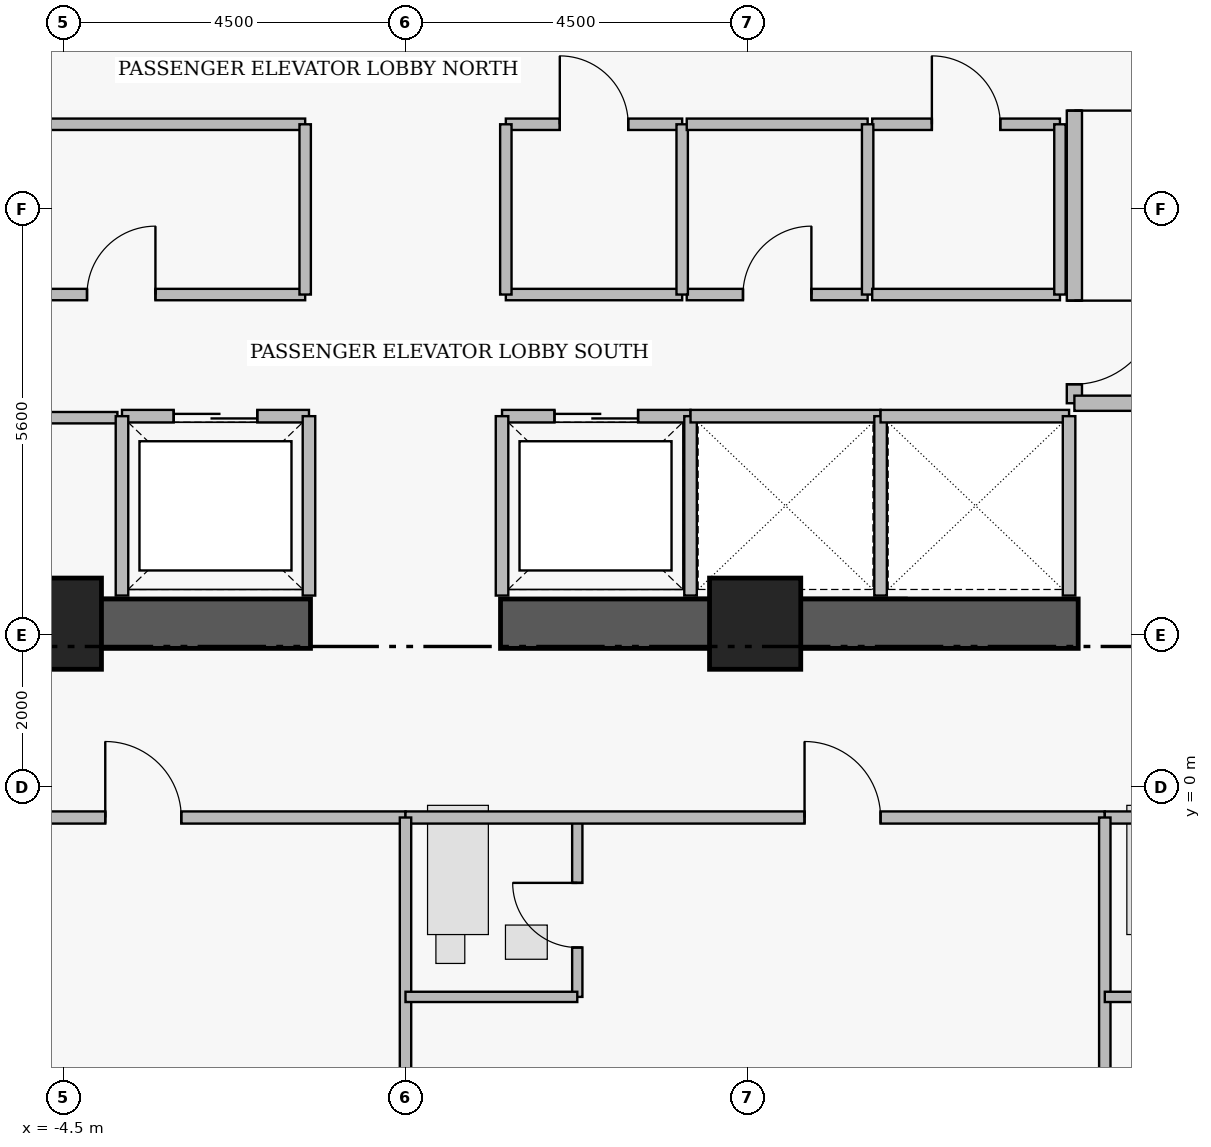
"""IFC4 building model, lengths in metres.
Left out: names, types, materials, properties, quantities, classifications, styles, units other than length and angle.
Written with IfcOpenShell. Run it as: python <this file> out.ifc"""

import sys

from ifc_helpers import new_model, si_unit, direction, frame, frame_2d, origin, origin_2d, place, context, subcontext, project, spatial, rectangle, extrude, element, fill, save


model = new_model("IFC4")
c1 = context("Model", 3, precision=1e-05, world=origin(), true_north=direction((0.0, 1.0)))
c2 = subcontext(c1, "Body", "Model", "MODEL_VIEW")
j1 = project(units=[si_unit("LENGTHUNIT", "METRE"), si_unit("PLANEANGLEUNIT", "RADIAN")], contexts=[c1])
p1 = place(None, origin())
s1 = spatial("IfcSite", under=j1, at=p1, CompositionType="ELEMENT")
p2 = place(p1, origin())
s2 = spatial("IfcBuilding", under=s1, at=p2, CompositionType="ELEMENT")
p3 = place(p2, frame((0.0, 0.0, 222.4)))
s3 = spatial("IfcBuildingStorey", under=s2, at=p3, CompositionType="ELEMENT", Elevation=222.4)
for number, where, z_axis, x_axis in (
    (1, (-8.85, 2.15, 0.0), (0.0, 0.0, 1.0), (1.0, 0.0, 0.0)),
    (2, (1.25, 2.15, 0.0), (0.0, 0.0, 1.0), (1.0, 0.0, 0.0)),
):
    element("IfcWall", number, at=place(p3, frame(where, z_axis=z_axis, x_axis=x_axis)), inside=s3, PredefinedType="SHEAR", context=c2, shape_type="SweptSolid", body=[
        extrude(rectangle(XDim=7.6, YDim=0.65, at=frame_2d((3.8, 0.0))), origin(), (0.0, 0.0, 1.0), 3.53),
    ])
for number, where, z_axis, x_axis in (
    (3, (-4.6, 2.15, 0.0), (0.0, 0.0, 1.0), (1.0, 0.0, 0.0)),
    (4, (4.6, 2.15, 0.0), (0.0, 0.0, 1.0), (1.0, 0.0, 0.0)),
):
    element("IfcColumn", number, at=place(p3, frame(where, z_axis=z_axis, x_axis=x_axis)), inside=s3, PredefinedType="COLUMN", context=c2, shape_type="SweptSolid", body=[
        extrude(rectangle(XDim=1.2, YDim=1.2, at=origin_2d()), origin(), (0.0, 0.0, 1.0), 3.75),
    ])
p4 = place(p3, frame((8.8, 11.15, 0.0), z_axis=(0.0, 0.0, 1.0), x_axis=(0.0, -1.0, 0.0)))
e5 = element("IfcWall", 5, at=p4, inside=s3, PredefinedType="PARTITIONING", context=c2, shape_type="SweptSolid", body=[
    extrude(rectangle(XDim=6.1, YDim=0.2, at=frame_2d((3.05, 0.0))), origin(), (0.0, 0.0, 1.0), 3.53),
])
p5 = place(p4, frame((1.15, 0.0, 0.0)))
e6 = element("IfcOpeningElement", 6, at=p5, cuts=e5, PredefinedType="OPENING", context=c2, shape_type="SweptSolid", body=[
    extrude(rectangle(XDim=1.1, YDim=2.2, at=frame_2d((0.55, 1.1))), frame((0.0, 0.11, 0.0), z_axis=(0.0, -1.0, 0.0), x_axis=(1.0, 0.0, 0.0)), (0.0, 0.0, 1.0), 0.22),
])
p6 = place(p4, frame((4.75, 0.0, 0.0)))
e7 = element("IfcOpeningElement", 7, at=p6, cuts=e5, PredefinedType="OPENING", context=c2, shape_type="SweptSolid", body=[
    extrude(rectangle(XDim=1.1, YDim=2.2, at=frame_2d((0.55, 1.1))), frame((0.0, 0.11, 0.0), z_axis=(0.0, -1.0, 0.0), x_axis=(1.0, 0.0, 0.0)), (0.0, 0.0, 1.0), 0.22),
])
p7 = place(p3, frame((-3.73, 4.88, 0.0), z_axis=(0.0, 0.0, 1.0), x_axis=(1.0, 0.0, 0.0)))
e8 = element("IfcWall", 8, at=p7, inside=s3, PredefinedType="PARTITIONING", context=c2, shape_type="SweptSolid", body=[
    extrude(rectangle(XDim=2.46, YDim=0.165, at=frame_2d((1.23, 0.0))), origin(), (0.0, 0.0, 1.0), 3.53),
])
p8 = place(p7, frame((0.68, 0.0, 0.0)))
e9 = element("IfcOpeningElement", 9, at=p8, cuts=e8, PredefinedType="OPENING", context=c2, shape_type="SweptSolid", body=[
    extrude(rectangle(XDim=1.1, YDim=2.25, at=frame_2d((0.55, 1.125))), frame((0.0, 0.093, 0.0), z_axis=(0.0, -1.0, 0.0), x_axis=(1.0, 0.0, 0.0)), (0.0, 0.0, 1.0), 0.185),
])
p9 = place(p3, frame((1.27, 4.88, 0.0), z_axis=(0.0, 0.0, 1.0), x_axis=(1.0, 0.0, 0.0)))
e10 = element("IfcWall", 10, at=p9, inside=s3, PredefinedType="PARTITIONING", context=c2, shape_type="SweptSolid", body=[
    extrude(rectangle(XDim=2.48, YDim=0.165, at=frame_2d((1.24, 0.0))), origin(), (0.0, 0.0, 1.0), 3.53),
])
p10 = place(p9, frame((0.69, 0.0, 0.0)))
e11 = element("IfcOpeningElement", 11, at=p10, cuts=e10, PredefinedType="OPENING", context=c2, shape_type="SweptSolid", body=[
    extrude(rectangle(XDim=1.1, YDim=2.25, at=frame_2d((0.55, 1.125))), frame((0.0, 0.093, 0.0), z_axis=(0.0, -1.0, 0.0), x_axis=(1.0, 0.0, 0.0)), (0.0, 0.0, 1.0), 0.185),
])
p11 = place(p3, frame((-8.31, 4.86, 0.0), z_axis=(0.0, 0.0, 1.0), x_axis=(1.0, 0.0, 0.0)))
e12 = element("IfcWall", 12, at=p11, inside=s3, PredefinedType="PARTITIONING", context=c2, shape_type="SweptSolid", body=[
    extrude(rectangle(XDim=4.52, YDim=0.15, at=frame_2d((2.26, 0.0))), origin(), (0.0, 0.0, 1.0), 3.53),
])
p12 = place(p11, frame((1.81, 0.0, 0.0)))
e13 = element("IfcOpeningElement", 13, at=p12, cuts=e12, PredefinedType="OPENING", context=c2, shape_type="SweptSolid", body=[
    extrude(rectangle(XDim=0.9, YDim=2.15, at=frame_2d((0.45, 1.075))), frame((0.0, 0.085, 0.0), z_axis=(0.0, -1.0, 0.0), x_axis=(1.0, 0.0, 0.0)), (0.0, 0.0, 1.0), 0.17),
])
p13 = place(p3, frame((-6.16, 6.48, 0.0), z_axis=(0.0, 0.0, 1.0), x_axis=(1.0, 0.0, 0.0)))
e14 = element("IfcWall", 14, at=p13, inside=s3, PredefinedType="PARTITIONING", context=c2, shape_type="SweptSolid", body=[
    extrude(rectangle(XDim=4.84, YDim=0.15, at=frame_2d((2.42, 0.0))), origin(), (0.0, 0.0, 1.0), 3.53),
])
p14 = place(p13, frame((1.97, 0.0, 0.0)))
e15 = element("IfcOpeningElement", 15, at=p14, cuts=e14, PredefinedType="OPENING", context=c2, shape_type="SweptSolid", body=[
    extrude(rectangle(XDim=0.9, YDim=2.15, at=frame_2d((0.45, 1.075))), frame((0.0, 0.085, 0.0), z_axis=(0.0, -1.0, 0.0), x_axis=(1.0, 0.0, 0.0)), (0.0, 0.0, 1.0), 0.17),
])
p15 = place(p3, frame((1.32, 8.72, 0.0), z_axis=(0.0, 0.0, 1.0), x_axis=(1.0, 0.0, 0.0)))
e16 = element("IfcWall", 16, at=p15, inside=s3, PredefinedType="PARTITIONING", context=c2, shape_type="SweptSolid", body=[
    extrude(rectangle(XDim=2.32, YDim=0.15, at=frame_2d((1.16, 0.0))), origin(), (0.0, 0.0, 1.0), 3.53),
])
p16 = place(p15, frame((0.71, 0.0, 0.0)))
e17 = element("IfcOpeningElement", 17, at=p16, cuts=e16, PredefinedType="OPENING", context=c2, shape_type="SweptSolid", body=[
    extrude(rectangle(XDim=0.9, YDim=2.15, at=frame_2d((0.45, 1.075))), frame((0.0, 0.085, 0.0), z_axis=(0.0, -1.0, 0.0), x_axis=(1.0, 0.0, 0.0)), (0.0, 0.0, 1.0), 0.17),
])
p17 = place(p3, frame((3.7, 6.48, 0.0), z_axis=(0.0, 0.0, 1.0), x_axis=(1.0, 0.0, 0.0)))
e18 = element("IfcWall", 18, at=p17, inside=s3, PredefinedType="PARTITIONING", context=c2, shape_type="SweptSolid", body=[
    extrude(rectangle(XDim=2.38, YDim=0.15, at=frame_2d((1.19, 0.0))), origin(), (0.0, 0.0, 1.0), 3.53),
])
p18 = place(p17, frame((0.74, 0.0, 0.0)))
e19 = element("IfcOpeningElement", 19, at=p18, cuts=e18, PredefinedType="OPENING", context=c2, shape_type="SweptSolid", body=[
    extrude(rectangle(XDim=0.9, YDim=2.15, at=frame_2d((0.45, 1.075))), frame((0.0, 0.085, 0.0), z_axis=(0.0, -1.0, 0.0), x_axis=(1.0, 0.0, 0.0)), (0.0, 0.0, 1.0), 0.17),
])
p19 = place(p3, frame((6.14, 8.72, 0.0), z_axis=(0.0, 0.0, 1.0), x_axis=(1.0, 0.0, 0.0)))
e20 = element("IfcWall", 20, at=p19, inside=s3, PredefinedType="PARTITIONING", context=c2, shape_type="SweptSolid", body=[
    extrude(rectangle(XDim=2.47, YDim=0.15, at=frame_2d((1.235, 0.0))), origin(), (0.0, 0.0, 1.0), 3.53),
])
p20 = place(p19, frame((0.785, 0.0, 0.0)))
e21 = element("IfcOpeningElement", 21, at=p20, cuts=e20, PredefinedType="OPENING", context=c2, shape_type="SweptSolid", body=[
    extrude(rectangle(XDim=0.9, YDim=2.15, at=frame_2d((0.45, 1.075))), frame((0.0, 0.085, 0.0), z_axis=(0.0, -1.0, 0.0), x_axis=(1.0, 0.0, 0.0)), (0.0, 0.0, 1.0), 0.17),
])
p21 = place(p3, frame((-9.2, -0.4, 0.0), z_axis=(0.0, 0.0, 1.0), x_axis=(1.0, 0.0, 0.0)))
e22 = element("IfcWall", 22, at=p21, inside=s3, PredefinedType="PARTITIONING", context=c2, shape_type="SweptSolid", body=[
    extrude(rectangle(XDim=9.2, YDim=0.16, at=frame_2d((4.6, 0.0))), origin(), (0.0, 0.0, 1.0), 3.53),
])
p22 = place(p21, frame((5.25, 0.0, 0.0)))
e23 = element("IfcOpeningElement", 23, at=p22, cuts=e22, PredefinedType="OPENING", context=c2, shape_type="SweptSolid", body=[
    extrude(rectangle(XDim=1.0, YDim=2.15, at=frame_2d((0.5, 1.075))), frame((0.0, 0.09, 0.0), z_axis=(0.0, -1.0, 0.0), x_axis=(1.0, 0.0, 0.0)), (0.0, 0.0, 1.0), 0.18),
])
p23 = place(p3, frame((2.26, -2.76, 0.0), z_axis=(0.0, 0.0, 1.0), x_axis=(0.0, 1.0, 0.0)))
e24 = element("IfcWall", 24, at=p23, inside=s3, PredefinedType="PLUMBINGWALL", context=c2, shape_type="SweptSolid", body=[
    extrude(rectangle(XDim=2.36, YDim=0.135, at=frame_2d((1.18, 0.0))), origin(), (0.0, 0.0, 1.0), 3.53),
])
p24 = place(p23, frame((0.65, 0.0, 0.0)))
e25 = element("IfcOpeningElement", 25, at=p24, cuts=e24, PredefinedType="OPENING", context=c2, shape_type="SweptSolid", body=[
    extrude(rectangle(XDim=0.85, YDim=2.1, at=frame_2d((0.425, 1.05))), frame((0.0, 0.077, 0.0), z_axis=(0.0, -1.0, 0.0), x_axis=(1.0, 0.0, 0.0)), (0.0, 0.0, 1.0), 0.155),
])
p25 = place(p3, frame((0.0, -0.4, 0.0), z_axis=(0.0, 0.0, 1.0), x_axis=(1.0, 0.0, 0.0)))
e26 = element("IfcWall", 26, at=p25, inside=s3, PredefinedType="PARTITIONING", context=c2, shape_type="SweptSolid", body=[
    extrude(rectangle(XDim=9.2, YDim=0.16, at=frame_2d((4.6, 0.0))), origin(), (0.0, 0.0, 1.0), 3.53),
])
p26 = place(p25, frame((5.25, 0.0, 0.0)))
e27 = element("IfcOpeningElement", 27, at=p26, cuts=e26, PredefinedType="OPENING", context=c2, shape_type="SweptSolid", body=[
    extrude(rectangle(XDim=1.0, YDim=2.15, at=frame_2d((0.5, 1.075))), frame((0.0, 0.09, 0.0), z_axis=(0.0, -1.0, 0.0), x_axis=(1.0, 0.0, 0.0)), (0.0, 0.0, 1.0), 0.18),
])
p27 = place(p3, frame((9.2, -0.4, 0.0), z_axis=(0.0, 0.0, 1.0), x_axis=(1.0, 0.0, 0.0)))
e28 = element("IfcWall", 28, at=p27, inside=s3, PredefinedType="PARTITIONING", context=c2, shape_type="SweptSolid", body=[
    extrude(rectangle(XDim=12.84, YDim=0.16, at=frame_2d((6.42, 0.0))), origin(), (0.0, 0.0, 1.0), 3.53),
])
p28 = place(p27, frame((7.07, 0.0, 0.0)))
e29 = element("IfcOpeningElement", 29, at=p28, cuts=e28, PredefinedType="OPENING", context=c2, shape_type="SweptSolid", body=[
    extrude(rectangle(XDim=1.0, YDim=2.15, at=frame_2d((0.5, 1.075))), frame((0.0, 0.09, 0.0), z_axis=(0.0, -1.0, 0.0), x_axis=(1.0, 0.0, 0.0)), (0.0, 0.0, 1.0), 0.18),
])
p29 = place(p3, frame((8.8, 5.05, 0.0), z_axis=(0.0, 0.0, 1.0), x_axis=(1.0, 0.0, 0.0)))
e30 = element("IfcWall", 30, at=p29, inside=s3, PredefinedType="PARTITIONING", context=c2, shape_type="SweptSolid", body=[
    extrude(rectangle(XDim=2.85, YDim=0.2, at=frame_2d((1.425, 0.0))), origin(), (0.0, 0.0, 1.0), 3.53),
])
for number, where, z_axis, x_axis in (
    (31, (-3.73, 2.52, 0.0), (0.0, 0.0, 1.0), (0.0, 1.0, 0.0)),
    (32, (-1.27, 2.52, 0.0), (0.0, 0.0, 1.0), (0.0, 1.0, 0.0)),
    (33, (1.27, 2.52, 0.0), (0.0, 0.0, 1.0), (0.0, 1.0, 0.0)),
    (34, (3.75, 2.52, 0.0), (0.0, 0.0, 1.0), (0.0, 1.0, 0.0)),
):
    element("IfcWall", number, at=place(p3, frame(where, z_axis=z_axis, x_axis=x_axis)), inside=s3, PredefinedType="PARTITIONING", context=c2, shape_type="SweptSolid", body=[
        extrude(rectangle(XDim=2.36, YDim=0.165, at=frame_2d((1.18, 0.0))), origin(), (0.0, 0.0, 1.0), 3.53),
    ])
p30 = place(p3, frame((3.75, 4.88, 0.0), z_axis=(0.0, 0.0, 1.0), x_axis=(1.0, 0.0, 0.0)))
e35 = element("IfcWall", 35, at=p30, inside=s3, PredefinedType="PARTITIONING", context=c2, shape_type="SweptSolid", body=[
    extrude(rectangle(XDim=2.5, YDim=0.165, at=frame_2d((1.25, 0.0))), origin(), (0.0, 0.0, 1.0), 3.53),
])
p31 = place(p3, frame((6.25, 2.52, 0.0), z_axis=(0.0, 0.0, 1.0), x_axis=(0.0, 1.0, 0.0)))
e36 = element("IfcWall", 36, at=p31, inside=s3, PredefinedType="PARTITIONING", context=c2, shape_type="SweptSolid", body=[
    extrude(rectangle(XDim=2.36, YDim=0.165, at=frame_2d((1.18, 0.0))), origin(), (0.0, 0.0, 1.0), 3.53),
])
p32 = place(p3, frame((6.25, 4.88, 0.0), z_axis=(0.0, 0.0, 1.0), x_axis=(1.0, 0.0, 0.0)))
e37 = element("IfcWall", 37, at=p32, inside=s3, PredefinedType="PARTITIONING", context=c2, shape_type="SweptSolid", body=[
    extrude(rectangle(XDim=2.48, YDim=0.165, at=frame_2d((1.24, 0.0))), origin(), (0.0, 0.0, 1.0), 3.53),
])
p33 = place(p3, frame((8.73, 2.52, 0.0), z_axis=(0.0, 0.0, 1.0), x_axis=(0.0, 1.0, 0.0)))
e38 = element("IfcWall", 38, at=p33, inside=s3, PredefinedType="PARTITIONING", context=c2, shape_type="SweptSolid", body=[
    extrude(rectangle(XDim=2.36, YDim=0.165, at=frame_2d((1.18, 0.0))), origin(), (0.0, 0.0, 1.0), 3.53),
])
p34 = place(p3, frame((-6.16, 8.72, 0.0), z_axis=(0.0, 0.0, 1.0), x_axis=(1.0, 0.0, 0.0)))
e39 = element("IfcWall", 39, at=p34, inside=s3, PredefinedType="PARTITIONING", context=c2, shape_type="SweptSolid", body=[
    extrude(rectangle(XDim=4.84, YDim=0.15, at=frame_2d((2.42, 0.0))), origin(), (0.0, 0.0, 1.0), 3.53),
])
p35 = place(p3, frame((-1.32, 6.48, 0.0), z_axis=(0.0, 0.0, 1.0), x_axis=(0.0, 1.0, 0.0)))
e40 = element("IfcWall", 40, at=p35, inside=s3, PredefinedType="PARTITIONING", context=c2, shape_type="SweptSolid", body=[
    extrude(rectangle(XDim=2.24, YDim=0.15, at=frame_2d((1.12, 0.0))), origin(), (0.0, 0.0, 1.0), 3.53),
])
p36 = place(p3, frame((1.32, 6.48, 0.0), z_axis=(0.0, 0.0, 1.0), x_axis=(1.0, 0.0, 0.0)))
e41 = element("IfcWall", 41, at=p36, inside=s3, PredefinedType="PARTITIONING", context=c2, shape_type="SweptSolid", body=[
    extrude(rectangle(XDim=2.32, YDim=0.15, at=frame_2d((1.16, 0.0))), origin(), (0.0, 0.0, 1.0), 3.53),
])
for number, where, z_axis, x_axis in (
    (42, (1.32, 6.48, 0.0), (0.0, 0.0, 1.0), (0.0, 1.0, 0.0)),
    (43, (3.64, 6.48, 0.0), (0.0, 0.0, 1.0), (0.0, 1.0, 0.0)),
):
    element("IfcWall", number, at=place(p3, frame(where, z_axis=z_axis, x_axis=x_axis)), inside=s3, PredefinedType="PARTITIONING", context=c2, shape_type="SweptSolid", body=[
        extrude(rectangle(XDim=2.24, YDim=0.15, at=frame_2d((1.12, 0.0))), origin(), (0.0, 0.0, 1.0), 3.53),
    ])
p37 = place(p3, frame((3.7, 8.72, 0.0), z_axis=(0.0, 0.0, 1.0), x_axis=(1.0, 0.0, 0.0)))
e44 = element("IfcWall", 44, at=p37, inside=s3, PredefinedType="PARTITIONING", context=c2, shape_type="SweptSolid", body=[
    extrude(rectangle(XDim=2.38, YDim=0.15, at=frame_2d((1.19, 0.0))), origin(), (0.0, 0.0, 1.0), 3.53),
])
p38 = place(p3, frame((6.08, 6.48, 0.0), z_axis=(0.0, 0.0, 1.0), x_axis=(0.0, 1.0, 0.0)))
e45 = element("IfcWall", 45, at=p38, inside=s3, PredefinedType="PARTITIONING", context=c2, shape_type="SweptSolid", body=[
    extrude(rectangle(XDim=2.24, YDim=0.15, at=frame_2d((1.12, 0.0))), origin(), (0.0, 0.0, 1.0), 3.53),
])
p39 = place(p3, frame((6.14, 6.48, 0.0), z_axis=(0.0, 0.0, 1.0), x_axis=(1.0, 0.0, 0.0)))
e46 = element("IfcWall", 46, at=p39, inside=s3, PredefinedType="PARTITIONING", context=c2, shape_type="SweptSolid", body=[
    extrude(rectangle(XDim=2.47, YDim=0.15, at=frame_2d((1.235, 0.0))), origin(), (0.0, 0.0, 1.0), 3.53),
])
p40 = place(p3, frame((8.61, 6.48, 0.0), z_axis=(0.0, 0.0, 1.0), x_axis=(0.0, 1.0, 0.0)))
e47 = element("IfcWall", 47, at=p40, inside=s3, PredefinedType="PARTITIONING", context=c2, shape_type="SweptSolid", body=[
    extrude(rectangle(XDim=2.24, YDim=0.15, at=frame_2d((1.12, 0.0))), origin(), (0.0, 0.0, 1.0), 3.53),
])
p41 = place(p3, frame((0.0, -7.52, 0.0), z_axis=(0.0, 0.0, 1.0), x_axis=(0.0, 1.0, 0.0)))
e48 = element("IfcWall", 48, at=p41, inside=s3, PredefinedType="PARTITIONING", context=c2, shape_type="SweptSolid", body=[
    extrude(rectangle(XDim=7.12, YDim=0.15, at=frame_2d((3.56, 0.0))), origin(), (0.0, 0.0, 1.0), 3.53),
])
p42 = place(p3, frame((0.0, -2.76, 0.0), z_axis=(0.0, 0.0, 1.0), x_axis=(1.0, 0.0, 0.0)))
e49 = element("IfcWall", 49, at=p42, inside=s3, PredefinedType="PLUMBINGWALL", context=c2, shape_type="SweptSolid", body=[
    extrude(rectangle(XDim=2.26, YDim=0.135, at=frame_2d((1.13, 0.0))), origin(), (0.0, 0.0, 1.0), 3.124),
])
p43 = place(p3, frame((9.2, -7.52, 0.0), z_axis=(0.0, 0.0, 1.0), x_axis=(0.0, 1.0, 0.0)))
e50 = element("IfcWall", 50, at=p43, inside=s3, PredefinedType="PARTITIONING", context=c2, shape_type="SweptSolid", body=[
    extrude(rectangle(XDim=7.12, YDim=0.15, at=frame_2d((3.56, 0.0))), origin(), (0.0, 0.0, 1.0), 3.53),
])
p44 = place(p3, frame((9.2, -2.76, 0.0), z_axis=(0.0, 0.0, 1.0), x_axis=(1.0, 0.0, 0.0)))
e51 = element("IfcWall", 51, at=p44, inside=s3, PredefinedType="PLUMBINGWALL", context=c2, shape_type="SweptSolid", body=[
    extrude(rectangle(XDim=2.26, YDim=0.135, at=frame_2d((1.13, 0.0))), origin(), (0.0, 0.0, 1.0), 3.124),
])
p45 = place(p5, origin())
e52 = element("IfcDoor", 52, at=p45, inside=s3, OperationType="SINGLE_SWING_RIGHT", PredefinedType="DOOR", context=c2, shape_type="SweptSolid", body=[
    extrude(rectangle(XDim=1.1, YDim=2.2, at=frame_2d((0.55, 1.1))), frame((0.0, 0.025, 0.0), z_axis=(0.0, -1.0, 0.0), x_axis=(1.0, 0.0, 0.0)), (0.0, 0.0, 1.0), 0.05),
])
fill(e6, e52)
p46 = place(p6, origin())
e53 = element("IfcDoor", 53, at=p46, inside=s3, OperationType="SINGLE_SWING_LEFT", PredefinedType="DOOR", context=c2, shape_type="SweptSolid", body=[
    extrude(rectangle(XDim=1.1, YDim=2.2, at=frame_2d((0.55, 1.1))), frame((0.0, 0.025, 0.0), z_axis=(0.0, -1.0, 0.0), x_axis=(1.0, 0.0, 0.0)), (0.0, 0.0, 1.0), 0.05),
])
fill(e7, e53)
p47 = place(p8, origin())
e54 = element("IfcDoor", 54, at=p47, inside=s3, OperationType="SLIDING_TO_LEFT", PredefinedType="DOOR", context=c2, shape_type="SweptSolid", body=[
    extrude(rectangle(XDim=1.1, YDim=2.25, at=frame_2d((0.55, 1.125))), frame((0.0, 0.025, 0.0), z_axis=(0.0, -1.0, 0.0), x_axis=(1.0, 0.0, 0.0)), (0.0, 0.0, 1.0), 0.05),
])
fill(e9, e54)
p48 = place(p10, origin())
e55 = element("IfcDoor", 55, at=p48, inside=s3, OperationType="SLIDING_TO_LEFT", PredefinedType="DOOR", context=c2, shape_type="SweptSolid", body=[
    extrude(rectangle(XDim=1.1, YDim=2.25, at=frame_2d((0.55, 1.125))), frame((0.0, 0.025, 0.0), z_axis=(0.0, -1.0, 0.0), x_axis=(1.0, 0.0, 0.0)), (0.0, 0.0, 1.0), 0.05),
])
fill(e11, e55)
p49 = place(p14, origin())
e56 = element("IfcDoor", 56, at=p49, inside=s3, OperationType="SINGLE_SWING_RIGHT", PredefinedType="DOOR", context=c2, shape_type="SweptSolid", body=[
    extrude(rectangle(XDim=0.9, YDim=2.15, at=frame_2d((0.45, 1.075))), frame((0.0, 0.025, 0.0), z_axis=(0.0, -1.0, 0.0), x_axis=(1.0, 0.0, 0.0)), (0.0, 0.0, 1.0), 0.05),
])
fill(e15, e56)
p50 = place(p16, origin())
e57 = element("IfcDoor", 57, at=p50, inside=s3, OperationType="SINGLE_SWING_LEFT", PredefinedType="DOOR", context=c2, shape_type="SweptSolid", body=[
    extrude(rectangle(XDim=0.9, YDim=2.15, at=frame_2d((0.45, 1.075))), frame((0.0, 0.025, 0.0), z_axis=(0.0, -1.0, 0.0), x_axis=(1.0, 0.0, 0.0)), (0.0, 0.0, 1.0), 0.05),
])
fill(e17, e57)
p51 = place(p18, origin())
e58 = element("IfcDoor", 58, at=p51, inside=s3, OperationType="SINGLE_SWING_RIGHT", PredefinedType="DOOR", context=c2, shape_type="SweptSolid", body=[
    extrude(rectangle(XDim=0.9, YDim=2.15, at=frame_2d((0.45, 1.075))), frame((0.0, 0.025, 0.0), z_axis=(0.0, -1.0, 0.0), x_axis=(1.0, 0.0, 0.0)), (0.0, 0.0, 1.0), 0.05),
])
fill(e19, e58)
p52 = place(p20, origin())
e59 = element("IfcDoor", 59, at=p52, inside=s3, OperationType="SINGLE_SWING_LEFT", PredefinedType="DOOR", context=c2, shape_type="SweptSolid", body=[
    extrude(rectangle(XDim=0.9, YDim=2.15, at=frame_2d((0.45, 1.075))), frame((0.0, 0.025, 0.0), z_axis=(0.0, -1.0, 0.0), x_axis=(1.0, 0.0, 0.0)), (0.0, 0.0, 1.0), 0.05),
])
fill(e21, e59)
p53 = place(p22, origin())
e60 = element("IfcDoor", 60, at=p53, inside=s3, OperationType="SINGLE_SWING_LEFT", PredefinedType="DOOR", context=c2, shape_type="SweptSolid", body=[
    extrude(rectangle(XDim=1.0, YDim=2.15, at=frame_2d((0.5, 1.075))), frame((0.0, 0.025, 0.0), z_axis=(0.0, -1.0, 0.0), x_axis=(1.0, 0.0, 0.0)), (0.0, 0.0, 1.0), 0.05),
])
fill(e23, e60)
p54 = place(p24, origin())
e61 = element("IfcDoor", 61, at=p54, inside=s3, OperationType="SINGLE_SWING_RIGHT", PredefinedType="DOOR", context=c2, shape_type="SweptSolid", body=[
    extrude(rectangle(XDim=0.85, YDim=2.1, at=frame_2d((0.425, 1.05))), frame((0.0, 0.025, 0.0), z_axis=(0.0, -1.0, 0.0), x_axis=(1.0, 0.0, 0.0)), (0.0, 0.0, 1.0), 0.05),
])
fill(e25, e61)
p55 = place(p26, origin())
e62 = element("IfcDoor", 62, at=p55, inside=s3, OperationType="SINGLE_SWING_LEFT", PredefinedType="DOOR", context=c2, shape_type="SweptSolid", body=[
    extrude(rectangle(XDim=1.0, YDim=2.15, at=frame_2d((0.5, 1.075))), frame((0.0, 0.025, 0.0), z_axis=(0.0, -1.0, 0.0), x_axis=(1.0, 0.0, 0.0)), (0.0, 0.0, 1.0), 0.05),
])
fill(e27, e62)
save(model, sys.argv[1])
